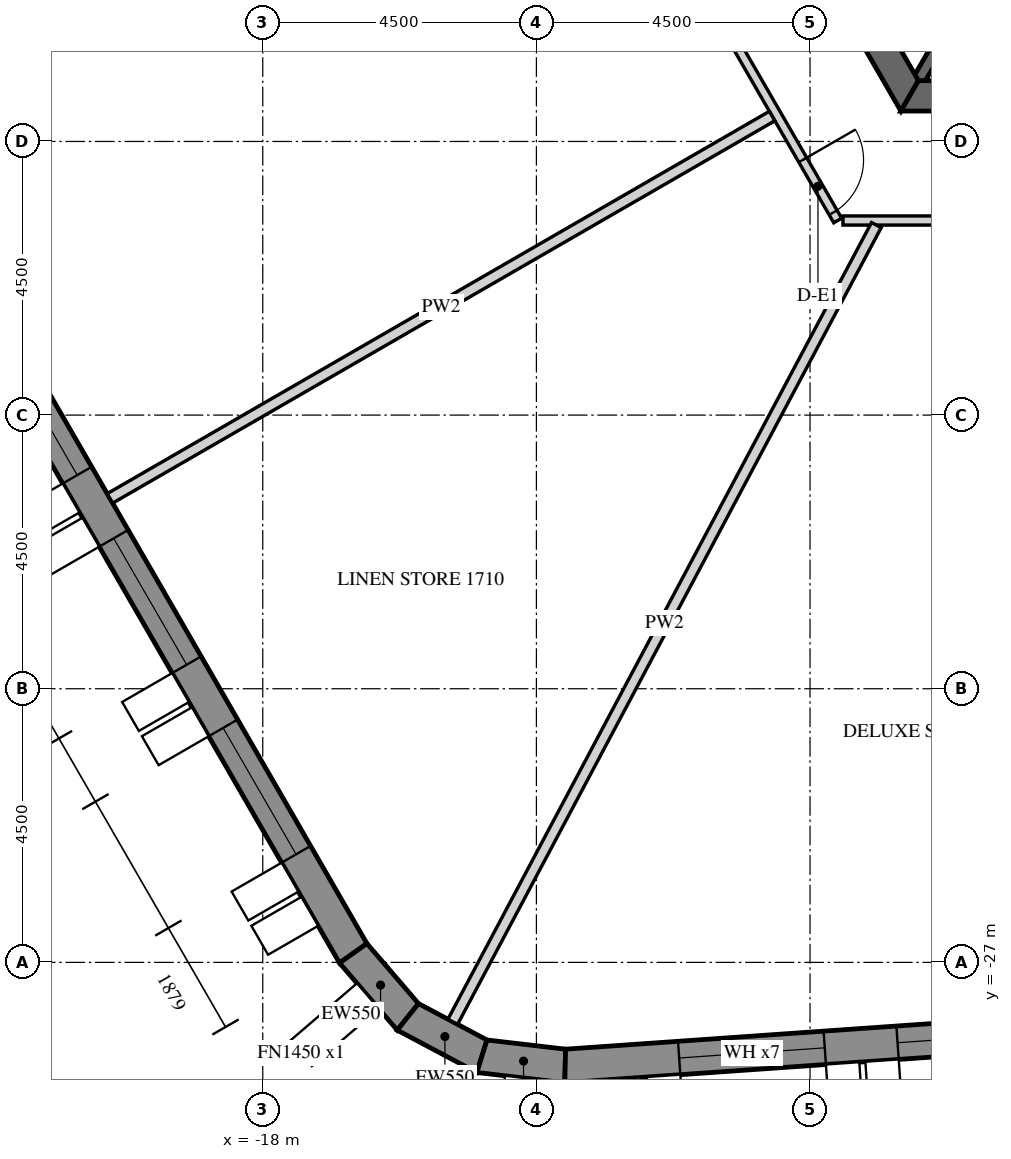
"""IFC4 building model, lengths in metres.
Left out: names, types, materials, properties, quantities, classifications, styles, units other than length and angle.
Written with IfcOpenShell. Run it as: python <this file> out.ifc"""

import sys

from ifc_helpers import new_model, si_unit, direction, frame, frame_2d, origin, place, context, subcontext, project, spatial, polyline, rectangle, outline, extrude, element, fill, save


model = new_model("IFC4")
c1 = context("Model", 3, precision=1e-05, world=origin(), true_north=direction((0.0, 1.0)))
c2 = subcontext(c1, "Body", "Model", "MODEL_VIEW")
j1 = project(units=[si_unit("LENGTHUNIT", "METRE"), si_unit("PLANEANGLEUNIT", "RADIAN")], contexts=[c1])
p1 = place(None, origin())
s1 = spatial("IfcSite", under=j1, at=p1, CompositionType="ELEMENT")
p2 = place(p1, origin())
s2 = spatial("IfcBuilding", under=s1, at=p2, CompositionType="ELEMENT")
p3 = place(p2, frame((0.0, 0.0, 215.1)))
s3 = spatial("IfcBuildingStorey", under=s2, at=p3, CompositionType="ELEMENT", Elevation=215.1)
p4 = place(p3, frame((-30.391, -2.811, -0.15), z_axis=(0.0, 0.0, 1.0), x_axis=(0.499998569178, -0.866026229868, 0.0)))
e1 = element("IfcWall", 1, at=p4, inside=s3, PredefinedType="SOLIDWALL", context=c2, shape_type="SweptSolid", body=[
    extrude(outline(polyline([(-0.022, -0.275), (27.783, -0.275), (27.732, 0.275), (0.022, 0.275), (-0.022, -0.275)])), origin(), (0.0, 0.0, 1.0), 3.9),
])
p5 = place(p4, frame((1.879, 0.0, 1.05)))
e2 = element("IfcOpeningElement", 2, at=p5, cuts=e1, PredefinedType="OPENING", context=c2, shape_type="SweptSolid", body=[
    extrude(rectangle(XDim=2.4, YDim=2.4, at=frame_2d((1.2, 1.2))), frame((0.0, 0.285, 0.0), z_axis=(0.0, -1.0, 0.0), x_axis=(1.0, 0.0, 0.0)), (0.0, 0.0, 1.0), 0.57),
])
p6 = place(p4, frame((5.479, 0.0, 1.05)))
e3 = element("IfcOpeningElement", 3, at=p6, cuts=e1, PredefinedType="OPENING", context=c2, shape_type="SweptSolid", body=[
    extrude(rectangle(XDim=2.4, YDim=2.4, at=frame_2d((1.2, 1.2))), frame((0.0, 0.285, 0.0), z_axis=(0.0, -1.0, 0.0), x_axis=(1.0, 0.0, 0.0)), (0.0, 0.0, 1.0), 0.57),
])
p7 = place(p4, frame((9.079, 0.0, 1.05)))
e4 = element("IfcOpeningElement", 4, at=p7, cuts=e1, PredefinedType="OPENING", context=c2, shape_type="SweptSolid", body=[
    extrude(rectangle(XDim=2.4, YDim=2.4, at=frame_2d((1.2, 1.2))), frame((0.0, 0.285, 0.0), z_axis=(0.0, -1.0, 0.0), x_axis=(1.0, 0.0, 0.0)), (0.0, 0.0, 1.0), 0.57),
])
p8 = place(p4, frame((12.679, 0.0, 1.05)))
e5 = element("IfcOpeningElement", 5, at=p8, cuts=e1, PredefinedType="OPENING", context=c2, shape_type="SweptSolid", body=[
    extrude(rectangle(XDim=2.4, YDim=2.4, at=frame_2d((1.2, 1.2))), frame((0.0, 0.285, 0.0), z_axis=(0.0, -1.0, 0.0), x_axis=(1.0, 0.0, 0.0)), (0.0, 0.0, 1.0), 0.57),
])
p9 = place(p4, frame((16.279, 0.0, 1.05)))
e6 = element("IfcOpeningElement", 6, at=p9, cuts=e1, PredefinedType="OPENING", context=c2, shape_type="SweptSolid", body=[
    extrude(rectangle(XDim=2.4, YDim=2.4, at=frame_2d((1.2, 1.2))), frame((0.0, 0.285, 0.0), z_axis=(0.0, -1.0, 0.0), x_axis=(1.0, 0.0, 0.0)), (0.0, 0.0, 1.0), 0.57),
])
p10 = place(p4, frame((19.879, 0.0, 1.05)))
e7 = element("IfcOpeningElement", 7, at=p10, cuts=e1, PredefinedType="OPENING", context=c2, shape_type="SweptSolid", body=[
    extrude(rectangle(XDim=2.4, YDim=2.4, at=frame_2d((1.2, 1.2))), frame((0.0, 0.285, 0.0), z_axis=(0.0, -1.0, 0.0), x_axis=(1.0, 0.0, 0.0)), (0.0, 0.0, 1.0), 0.57),
])
p11 = place(p4, frame((23.479, 0.0, 1.05)))
e8 = element("IfcOpeningElement", 8, at=p11, cuts=e1, PredefinedType="OPENING", context=c2, shape_type="SweptSolid", body=[
    extrude(rectangle(XDim=2.4, YDim=2.4, at=frame_2d((1.2, 1.2))), frame((0.0, 0.285, 0.0), z_axis=(0.0, -1.0, 0.0), x_axis=(1.0, 0.0, 0.0)), (0.0, 0.0, 1.0), 0.57),
])
p12 = place(p3, frame((-16.512, -26.85, -0.15), z_axis=(0.0, 0.0, 1.0), x_axis=(0.651621950847, -0.758543890078, 0.0)))
e9 = element("IfcWall", 9, at=p12, inside=s3, PredefinedType="SOLIDWALL", context=c2, shape_type="SweptSolid", body=[
    extrude(outline(polyline([(-0.026, -0.275), (1.431, -0.275), (1.327, 0.275), (0.026, 0.275), (-0.026, -0.275)])), origin(), (0.0, 0.0, 1.0), 3.9),
])
p13 = place(p3, frame((-15.614, -27.896, -0.15), z_axis=(0.0, 0.0, 1.0), x_axis=(0.882994189209, -0.469383917304, 0.0)))
e10 = element("IfcWall", 10, at=p13, inside=s3, PredefinedType="SOLIDWALL", context=c2, shape_type="SweptSolid", body=[
    extrude(outline(polyline([(-0.052, -0.275), (1.431, -0.275), (1.327, 0.275), (0.052, 0.275), (-0.052, -0.275)])), origin(), (0.0, 0.0, 1.0), 3.9),
])
p14 = place(p3, frame((-14.396, -28.543, -0.15), z_axis=(0.0, 0.0, 1.0), x_axis=(0.993232537394, -0.11614269956, 0.0)))
e11 = element("IfcWall", 11, at=p14, inside=s3, PredefinedType="SOLIDWALL", context=c2, shape_type="SweptSolid", body=[
    extrude(outline(polyline([(-0.052, -0.275), (1.405, -0.275), (1.353, 0.275), (0.052, 0.275), (-0.052, -0.275)])), origin(), (0.0, 0.0, 1.0), 3.9),
])
p15 = place(p3, frame((-13.026, -28.704, -0.15), z_axis=(0.0, 0.0, 1.0), x_axis=(0.99756406806, 0.069756219185, 0.0)))
e12 = element("IfcWall", 12, at=p15, inside=s3, PredefinedType="SOLIDWALL", context=c2, shape_type="SweptSolid", body=[
    extrude(outline(polyline([(-0.026, -0.275), (27.78, -0.275), (27.735, 0.275), (0.026, 0.275), (-0.026, -0.275)])), origin(), (0.0, 0.0, 1.0), 3.9),
])
p16 = place(p15, frame((1.879, 0.0, 1.05)))
e13 = element("IfcOpeningElement", 13, at=p16, cuts=e12, PredefinedType="OPENING", context=c2, shape_type="SweptSolid", body=[
    extrude(rectangle(XDim=2.4, YDim=2.4, at=frame_2d((1.2, 1.2))), frame((0.0, 0.285, 0.0), z_axis=(0.0, -1.0, 0.0), x_axis=(1.0, 0.0, 0.0)), (0.0, 0.0, 1.0), 0.57),
])
p17 = place(p15, frame((5.479, 0.0, 1.05)))
e14 = element("IfcOpeningElement", 14, at=p17, cuts=e12, PredefinedType="OPENING", context=c2, shape_type="SweptSolid", body=[
    extrude(rectangle(XDim=2.4, YDim=2.4, at=frame_2d((1.2, 1.2))), frame((0.0, 0.285, 0.0), z_axis=(0.0, -1.0, 0.0), x_axis=(1.0, 0.0, 0.0)), (0.0, 0.0, 1.0), 0.57),
])
p18 = place(p15, frame((9.079, 0.0, 1.05)))
e15 = element("IfcOpeningElement", 15, at=p18, cuts=e12, PredefinedType="OPENING", context=c2, shape_type="SweptSolid", body=[
    extrude(rectangle(XDim=2.4, YDim=2.4, at=frame_2d((1.2, 1.2))), frame((0.0, 0.285, 0.0), z_axis=(0.0, -1.0, 0.0), x_axis=(1.0, 0.0, 0.0)), (0.0, 0.0, 1.0), 0.57),
])
p19 = place(p15, frame((12.679, 0.0, 1.05)))
e16 = element("IfcOpeningElement", 16, at=p19, cuts=e12, PredefinedType="OPENING", context=c2, shape_type="SweptSolid", body=[
    extrude(rectangle(XDim=2.4, YDim=2.4, at=frame_2d((1.2, 1.2))), frame((0.0, 0.285, 0.0), z_axis=(0.0, -1.0, 0.0), x_axis=(1.0, 0.0, 0.0)), (0.0, 0.0, 1.0), 0.57),
])
p20 = place(p15, frame((16.279, 0.0, 1.05)))
e17 = element("IfcOpeningElement", 17, at=p20, cuts=e12, PredefinedType="OPENING", context=c2, shape_type="SweptSolid", body=[
    extrude(rectangle(XDim=2.4, YDim=2.4, at=frame_2d((1.2, 1.2))), frame((0.0, 0.285, 0.0), z_axis=(0.0, -1.0, 0.0), x_axis=(1.0, 0.0, 0.0)), (0.0, 0.0, 1.0), 0.57),
])
p21 = place(p15, frame((19.879, 0.0, 1.05)))
e18 = element("IfcOpeningElement", 18, at=p21, cuts=e12, PredefinedType="OPENING", context=c2, shape_type="SweptSolid", body=[
    extrude(rectangle(XDim=2.4, YDim=2.4, at=frame_2d((1.2, 1.2))), frame((0.0, 0.285, 0.0), z_axis=(0.0, -1.0, 0.0), x_axis=(1.0, 0.0, 0.0)), (0.0, 0.0, 1.0), 0.57),
])
p22 = place(p15, frame((23.479, 0.0, 1.05)))
e19 = element("IfcOpeningElement", 19, at=p22, cuts=e12, PredefinedType="OPENING", context=c2, shape_type="SweptSolid", body=[
    extrude(rectangle(XDim=2.4, YDim=2.4, at=frame_2d((1.2, 1.2))), frame((0.0, 0.285, 0.0), z_axis=(0.0, -1.0, 0.0), x_axis=(1.0, 0.0, 0.0)), (0.0, 0.0, 1.0), 0.57),
])
p23 = place(p3, frame((-14.722, 0.0, -0.15), z_axis=(0.0, 0.0, 1.0), x_axis=(0.50000571537, -0.866022103989, 0.0)))
e20 = element("IfcWall", 20, at=p23, inside=s3, PredefinedType="SHEAR", context=c2, shape_type="SweptSolid", body=[
    extrude(outline(polyline([(-0.144, -0.25), (14.867, -0.25), (14.578, 0.25), (0.144, 0.25), (-0.144, -0.25)])), origin(), (0.0, 0.0, 1.0), 3.9),
])
p24 = place(p23, frame((6.432, 0.0, 0.15)))
e21 = element("IfcOpeningElement", 21, at=p24, cuts=e20, PredefinedType="OPENING", context=c2, shape_type="SweptSolid", body=[
    extrude(rectangle(XDim=1.8, YDim=2.4, at=frame_2d((0.9, 1.2))), frame((0.0, 0.26, 0.0), z_axis=(0.0, -1.0, 0.0), x_axis=(1.0, 0.0, 0.0)), (0.0, 0.0, 1.0), 0.52),
])
p25 = place(p3, frame((-7.361, -12.75, -0.15), z_axis=(0.0, 0.0, 1.0), x_axis=(1.0, 0.0, 0.0)))
e22 = element("IfcWall", 22, at=p25, inside=s3, PredefinedType="SHEAR", context=c2, shape_type="SweptSolid", body=[
    extrude(outline(polyline([(-0.144, -0.25), (14.866, -0.25), (14.578, 0.25), (0.144, 0.25), (-0.144, -0.25)])), origin(), (0.0, 0.0, 1.0), 3.9),
])
p26 = place(p25, frame((6.761, 0.0, 0.15)))
e23 = element("IfcOpeningElement", 23, at=p26, cuts=e22, PredefinedType="OPENING", context=c2, shape_type="SweptSolid", body=[
    extrude(rectangle(XDim=1.2, YDim=2.4, at=frame_2d((0.6, 1.2))), frame((0.0, 0.26, 0.0), z_axis=(0.0, -1.0, 0.0), x_axis=(1.0, 0.0, 0.0)), (0.0, 0.0, 1.0), 0.52),
])
p27 = place(p3, frame((-5.773, -10.0, -0.15), z_axis=(0.0, 0.0, 1.0), x_axis=(-0.499995765644, -0.866027848477, 0.0)))
e24 = element("IfcWall", 24, at=p27, inside=s3, PredefinedType="SHEAR", context=c2, shape_type="SweptSolid", body=[
    extrude(rectangle(XDim=2.887, YDim=0.2, at=frame_2d((1.443, 0.0))), origin(), (0.0, 0.0, 1.0), 3.9),
])
p28 = place(p3, frame((-15.863, -2.125, 0.0), z_axis=(0.0, 0.0, 1.0), x_axis=(0.500008833422, -0.866020303746, 0.0)))
e25 = element("IfcWall", 25, at=p28, inside=s3, PredefinedType="PARTITIONING", context=c2, shape_type="SweptSolid", body=[
    extrude(rectangle(XDim=14.636, YDim=0.15, at=frame_2d((7.318, 0.0))), origin(), (0.0, 0.0, 1.0), 2.988),
])
p29 = place(p28, frame((4.909, 0.0, 0.0)))
e26 = element("IfcOpeningElement", 26, at=p29, cuts=e25, PredefinedType="OPENING", context=c2, shape_type="SweptSolid", body=[
    extrude(rectangle(XDim=1.0, YDim=2.1, at=frame_2d((0.5, 1.05))), frame((0.0, 0.085, 0.0), z_axis=(0.0, -1.0, 0.0), x_axis=(1.0, 0.0, 0.0)), (0.0, 0.0, 1.0), 0.17),
])
p30 = place(p28, frame((13.486, 0.0, 0.0)))
e27 = element("IfcOpeningElement", 27, at=p30, cuts=e25, PredefinedType="OPENING", context=c2, shape_type="SweptSolid", body=[
    extrude(rectangle(XDim=1.0, YDim=2.1, at=frame_2d((0.5, 1.05))), frame((0.0, 0.085, 0.0), z_axis=(0.0, -1.0, 0.0), x_axis=(1.0, 0.0, 0.0)), (0.0, 0.0, 1.0), 0.17),
])
p31 = place(p3, frame((-8.458, -14.8, 0.0), z_axis=(0.0, 0.0, 1.0), x_axis=(1.0, 0.0, 0.0)))
e28 = element("IfcWall", 28, at=p31, inside=s3, PredefinedType="PARTITIONING", context=c2, shape_type="SweptSolid", body=[
    extrude(rectangle(XDim=14.636, YDim=0.15, at=frame_2d((7.318, 0.0))), origin(), (0.0, 0.0, 1.0), 2.988),
])
p32 = place(p31, frame((1.881, 0.0, 0.0)))
e29 = element("IfcOpeningElement", 29, at=p32, cuts=e28, PredefinedType="OPENING", context=c2, shape_type="SweptSolid", body=[
    extrude(rectangle(XDim=1.0, YDim=2.1, at=frame_2d((0.5, 1.05))), frame((0.0, 0.085, 0.0), z_axis=(0.0, -1.0, 0.0), x_axis=(1.0, 0.0, 0.0)), (0.0, 0.0, 1.0), 0.17),
])
p33 = place(p31, frame((7.872, 0.0, 0.0)))
e30 = element("IfcOpeningElement", 30, at=p33, cuts=e28, PredefinedType="OPENING", context=c2, shape_type="SweptSolid", body=[
    extrude(rectangle(XDim=1.0, YDim=2.1, at=frame_2d((0.5, 1.05))), frame((0.0, 0.085, 0.0), z_axis=(0.0, -1.0, 0.0), x_axis=(1.0, 0.0, 0.0)), (0.0, 0.0, 1.0), 0.17),
])
p34 = place(p31, frame((13.303, 0.0, 0.0)))
e31 = element("IfcOpeningElement", 31, at=p34, cuts=e28, PredefinedType="OPENING", context=c2, shape_type="SweptSolid", body=[
    extrude(rectangle(XDim=1.0, YDim=2.1, at=frame_2d((0.5, 1.05))), frame((0.0, 0.085, 0.0), z_axis=(0.0, -1.0, 0.0), x_axis=(1.0, 0.0, 0.0)), (0.0, 0.0, 1.0), 0.17),
])
p35 = place(p3, frame((-20.513, -19.37, 0.0), z_axis=(0.0, 0.0, 1.0), x_axis=(0.866019402111, 0.500010395058, 0.0)))
e32 = element("IfcWall", 32, at=p35, inside=s3, PredefinedType="PARTITIONING", context=c2, shape_type="SweptSolid", body=[
    extrude(rectangle(XDim=12.575, YDim=0.18, at=frame_2d((6.288, 0.0))), origin(), (0.0, 0.0, 1.0), 2.988),
])
p36 = place(p3, frame((-14.876, -27.977, 0.0), z_axis=(0.0, 0.0, 1.0), x_axis=(0.469475175214, 0.882945672088, 0.0)))
e33 = element("IfcWall", 33, at=p36, inside=s3, PredefinedType="PARTITIONING", context=c2, shape_type="SweptSolid", body=[
    extrude(rectangle(XDim=14.839, YDim=0.18, at=frame_2d((7.419, 0.0))), origin(), (0.0, 0.0, 1.0), 2.988),
])
p37 = place(p9, frame((0.0, 0.205, 0.0)))
e34 = element("IfcWindow", 34, at=p37, inside=s3, PartitioningType="DOUBLE_PANEL_VERTICAL", PredefinedType="WINDOW", context=c2, shape_type="SweptSolid", body=[
    extrude(rectangle(XDim=2.4, YDim=2.4, at=frame_2d((1.2, 1.2))), frame((0.0, 0.03, 0.0), z_axis=(0.0, -1.0, 0.0), x_axis=(1.0, 0.0, 0.0)), (0.0, 0.0, 1.0), 0.06),
])
fill(e6, e34)
p38 = place(p10, frame((0.0, 0.205, 0.0)))
e35 = element("IfcWindow", 35, at=p38, inside=s3, PartitioningType="DOUBLE_PANEL_VERTICAL", PredefinedType="WINDOW", context=c2, shape_type="SweptSolid", body=[
    extrude(rectangle(XDim=2.4, YDim=2.4, at=frame_2d((1.2, 1.2))), frame((0.0, 0.03, 0.0), z_axis=(0.0, -1.0, 0.0), x_axis=(1.0, 0.0, 0.0)), (0.0, 0.0, 1.0), 0.06),
])
fill(e7, e35)
p39 = place(p11, frame((0.0, 0.205, 0.0)))
e36 = element("IfcWindow", 36, at=p39, inside=s3, PartitioningType="DOUBLE_PANEL_VERTICAL", PredefinedType="WINDOW", context=c2, shape_type="SweptSolid", body=[
    extrude(rectangle(XDim=2.4, YDim=2.4, at=frame_2d((1.2, 1.2))), frame((0.0, 0.03, 0.0), z_axis=(0.0, -1.0, 0.0), x_axis=(1.0, 0.0, 0.0)), (0.0, 0.0, 1.0), 0.06),
])
fill(e8, e36)
p40 = place(p16, frame((0.0, 0.205, 0.0)))
e37 = element("IfcWindow", 37, at=p40, inside=s3, PartitioningType="DOUBLE_PANEL_VERTICAL", PredefinedType="WINDOW", context=c2, shape_type="SweptSolid", body=[
    extrude(rectangle(XDim=2.4, YDim=2.4, at=frame_2d((1.2, 1.2))), frame((0.0, 0.03, 0.0), z_axis=(0.0, -1.0, 0.0), x_axis=(1.0, 0.0, 0.0)), (0.0, 0.0, 1.0), 0.06),
])
fill(e13, e37)
p41 = place(p17, frame((0.0, 0.205, 0.0)))
e38 = element("IfcWindow", 38, at=p41, inside=s3, PartitioningType="DOUBLE_PANEL_VERTICAL", PredefinedType="WINDOW", context=c2, shape_type="SweptSolid", body=[
    extrude(rectangle(XDim=2.4, YDim=2.4, at=frame_2d((1.2, 1.2))), frame((0.0, 0.03, 0.0), z_axis=(0.0, -1.0, 0.0), x_axis=(1.0, 0.0, 0.0)), (0.0, 0.0, 1.0), 0.06),
])
fill(e14, e38)
p42 = place(p30, origin())
e39 = element("IfcDoor", 39, at=p42, inside=s3, OperationType="SINGLE_SWING_LEFT", PredefinedType="DOOR", context=c2, shape_type="SweptSolid", body=[
    extrude(rectangle(XDim=1.0, YDim=2.1, at=frame_2d((0.5, 1.05))), frame((0.0, 0.025, 0.0), z_axis=(0.0, -1.0, 0.0), x_axis=(1.0, 0.0, 0.0)), (0.0, 0.0, 1.0), 0.05),
])
fill(e27, e39)
save(model, sys.argv[1])
